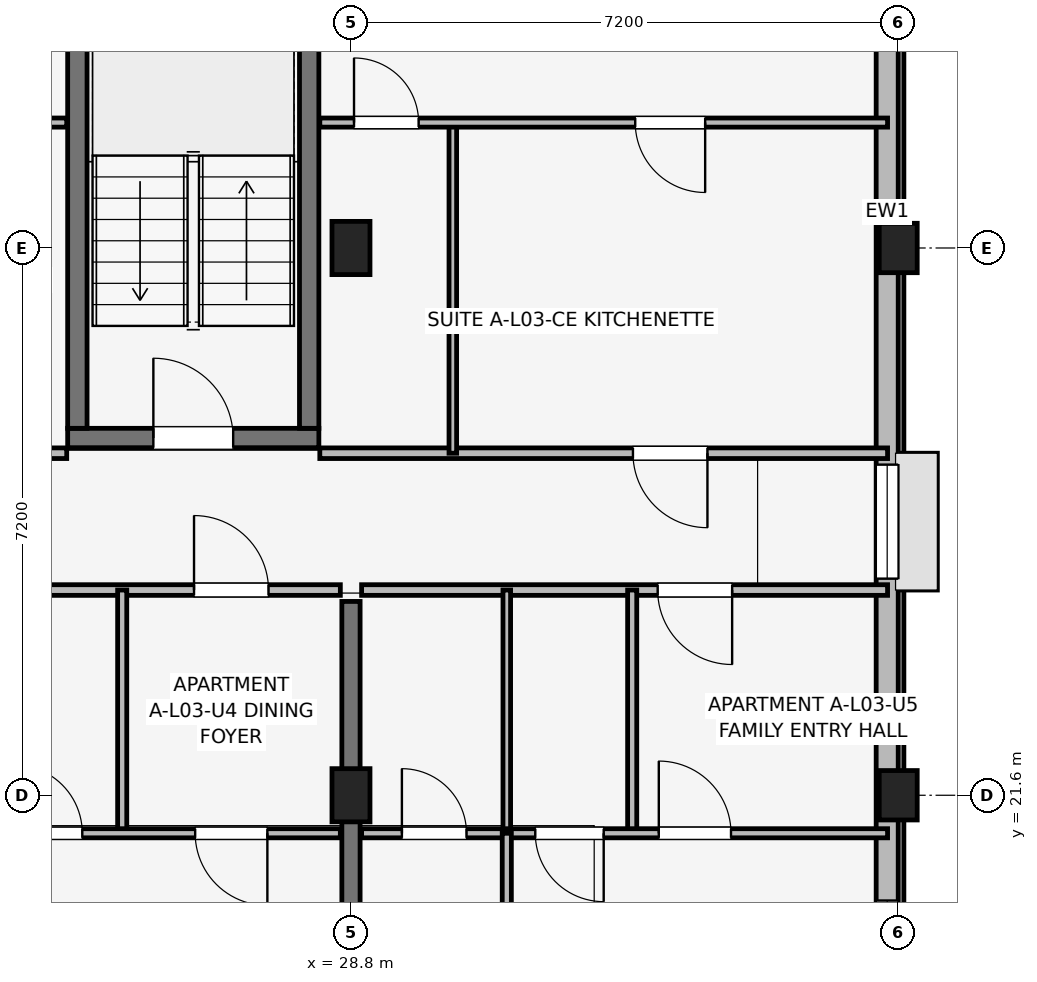
"""IFC4 building model, lengths in metres.
Left out: names, types, materials, properties, quantities, classifications, styles, units other than length and angle.
Written with IfcOpenShell. Run it as: python <this file> out.ifc"""

import sys

from ifc_helpers import new_model, si_unit, direction, frame, frame_2d, origin, origin_2d, place, context, subcontext, project, spatial, rectangle, extrude, element, fill, save


model = new_model("IFC4")
c1 = context("Model", 3, precision=1e-05, world=origin(), true_north=direction((0.0, 1.0)))
c2 = subcontext(c1, "Body", "Model", "MODEL_VIEW")
j1 = project(units=[si_unit("LENGTHUNIT", "METRE"), si_unit("PLANEANGLEUNIT", "RADIAN")], contexts=[c1])
p1 = place(None, origin())
s1 = spatial("IfcSite", under=j1, at=p1, CompositionType="ELEMENT")
p2 = place(p1, origin())
s2 = spatial("IfcBuilding", under=s1, at=p2, CompositionType="ELEMENT")
p3 = place(p2, frame((0.0, 0.0, 11.85)))
s3 = spatial("IfcBuildingStorey", under=s2, at=p3, CompositionType="ELEMENT", Elevation=11.85)
for number, where, z_axis, x_axis in (
    (1, (28.8, 21.6, 0.0), (0.0, 0.0, 1.0), (1.0, 0.0, 0.0)),
    (2, (28.8, 28.8, 0.0), (0.0, 0.0, 1.0), (1.0, 0.0, 0.0)),
):
    element("IfcColumn", number, at=place(p3, frame(where, z_axis=z_axis, x_axis=x_axis)), inside=s3, PredefinedType="COLUMN", context=c2, shape_type="SweptSolid", body=[
        extrude(rectangle(XDim=0.5, YDim=0.7, at=origin_2d()), origin(), (0.0, 0.0, 1.0), 3.15),
    ])
for number, where, z_axis, x_axis in (
    (3, (36.0, 21.6, 0.0), (0.0, 0.0, 1.0), (1.0, 0.0, 0.0)),
    (4, (36.0, 28.8, 0.0), (0.0, 0.0, 1.0), (1.0, 0.0, 0.0)),
):
    element("IfcColumn", number, at=place(p3, frame(where, z_axis=z_axis, x_axis=x_axis)), inside=s3, PredefinedType="COLUMN", context=c2, shape_type="SweptSolid", body=[
        extrude(rectangle(XDim=0.5, YDim=0.65, at=origin_2d()), origin(), (0.0, 0.0, 1.0), 3.15),
    ])
p4 = place(p3, frame((25.073, 26.3, 0.0), z_axis=(0.0, 0.0, 1.0), x_axis=(1.0, 0.0, 0.0)))
e5 = element("IfcWall", 5, at=p4, inside=s3, PredefinedType="SHEAR", context=c2, shape_type="SweptSolid", body=[
    extrude(rectangle(XDim=3.305, YDim=0.255, at=frame_2d((1.652, 0.0))), origin(), (0.0, 0.0, 1.0), 3.15),
])
p5 = place(p4, frame((1.127, 0.0, 0.0)))
e6 = element("IfcOpeningElement", 6, at=p5, cuts=e5, PredefinedType="OPENING", context=c2, shape_type="SweptSolid", body=[
    extrude(rectangle(XDim=1.05, YDim=2.12, at=frame_2d((0.525, 1.06))), frame((0.0, 0.137, 0.0), z_axis=(0.0, -1.0, 0.0), x_axis=(1.0, 0.0, 0.0)), (0.0, 0.0, 1.0), 0.275),
])
for number, where, z_axis, x_axis in (
    (7, (25.2, 26.427, 0.0), (0.0, 0.0, 1.0), (0.0, 1.0, 0.0)),
    (8, (28.25, 26.427, 0.0), (0.0, 0.0, 1.0), (0.0, 1.0, 0.0)),
):
    element("IfcWall", number, at=place(p3, frame(where, z_axis=z_axis, x_axis=x_axis)), inside=s3, PredefinedType="SHEAR", context=c2, shape_type="SweptSolid", body=[
        extrude(rectangle(XDim=6.295, YDim=0.255, at=frame_2d((3.147, 0.0))), origin(), (0.0, 0.0, 1.0), 3.15),
    ])
p6 = place(p3, frame((28.8, 14.75, 0.0), z_axis=(0.0, 0.0, 1.0), x_axis=(0.0, 1.0, 0.0)))
e9 = element("IfcWall", 9, at=p6, inside=s3, PredefinedType="SHEAR", context=c2, shape_type="SweptSolid", body=[
    extrude(rectangle(XDim=9.4, YDim=0.24, at=frame_2d((4.7, 0.0))), origin(), (0.0, 0.0, 1.0), 3.15),
])
p7 = place(p3, frame((35.855, 17.8, 0.0), z_axis=(0.0, 0.0, 1.0), x_axis=(0.0, 1.0, 0.0)))
e10 = element("IfcWall", 10, at=p7, inside=s3, PredefinedType="SOLIDWALL", context=c2, shape_type="SweptSolid", body=[
    extrude(rectangle(XDim=14.8, YDim=0.29, at=frame_2d((7.4, 0.0))), origin(), (0.0, 0.0, 1.0), 2.38),
])
p8 = place(p7, frame((6.65, 0.0, 1.05)))
e11 = element("IfcOpeningElement", 11, at=p8, cuts=e10, PredefinedType="OPENING", context=c2, shape_type="SweptSolid", body=[
    extrude(rectangle(XDim=1.5, YDim=1.15, at=frame_2d((0.75, 0.575))), frame((0.0, 0.155, 0.0), z_axis=(0.0, -1.0, 0.0), x_axis=(1.0, 0.0, 0.0)), (0.0, 0.0, 1.0), 0.31),
])
p9 = place(p7, frame((1.115, 0.0, 0.72)))
e12 = element("IfcOpeningElement", 12, at=p9, cuts=e10, PredefinedType="OPENING", context=c2, shape_type="SweptSolid", body=[
    extrude(rectangle(XDim=1.3, YDim=1.55, at=frame_2d((0.65, 0.775))), frame((0.0, 0.155, 0.0), z_axis=(0.0, -1.0, 0.0), x_axis=(1.0, 0.0, 0.0)), (0.0, 0.0, 1.0), 0.31),
])
p10 = place(p3, frame((21.74, 24.3, 0.0), z_axis=(0.0, 0.0, 1.0), x_axis=(1.0, 0.0, 0.0)))
e13 = element("IfcWall", 13, at=p10, inside=s3, PredefinedType="PARTITIONING", context=c2, shape_type="SweptSolid", body=[
    extrude(rectangle(XDim=6.92, YDim=0.14, at=frame_2d((3.46, 0.0))), origin(), (0.0, 0.0, 1.0), 2.38),
])
p11 = place(p10, frame((4.995, 0.0, 0.0)))
e14 = element("IfcOpeningElement", 14, at=p11, cuts=e13, PredefinedType="OPENING", context=c2, shape_type="SweptSolid", body=[
    extrude(rectangle(XDim=0.98, YDim=2.1, at=frame_2d((0.49, 1.05))), frame((0.0, 0.08, 0.0), z_axis=(0.0, -1.0, 0.0), x_axis=(1.0, 0.0, 0.0)), (0.0, 0.0, 1.0), 0.16),
])
p12 = place(p3, frame((25.79, 21.1, 0.0), z_axis=(0.0, 0.0, 1.0), x_axis=(0.0, 1.0, 0.0)))
e15 = element("IfcWall", 15, at=p12, inside=s3, PredefinedType="PARTITIONING", context=c2, shape_type="SweptSolid", body=[
    extrude(rectangle(XDim=3.2, YDim=0.12, at=frame_2d((1.6, 0.0))), origin(), (0.0, 0.0, 1.0), 2.375),
])
p13 = place(p3, frame((21.74, 21.1, 0.0), z_axis=(0.0, 0.0, 1.0), x_axis=(1.0, 0.0, 0.0)))
e16 = element("IfcWall", 16, at=p13, inside=s3, PredefinedType="PARTITIONING", context=c2, shape_type="SweptSolid", body=[
    extrude(rectangle(XDim=6.92, YDim=0.12, at=frame_2d((3.46, 0.0))), origin(), (0.0, 0.0, 1.0), 2.38),
])
p14 = place(p13, frame((1.475, 0.0, 0.0), z_axis=(0.0, 0.0, 1.0), x_axis=(-1.0, 0.0, 0.0)))
e17 = element("IfcOpeningElement", 17, at=p14, cuts=e16, PredefinedType="OPENING", context=c2, shape_type="SweptSolid", body=[
    extrude(rectangle(XDim=0.85, YDim=2.08, at=frame_2d((0.425, 1.04))), frame((0.0, 0.07, 0.0), z_axis=(0.0, -1.0, 0.0), x_axis=(1.0, 0.0, 0.0)), (0.0, 0.0, 1.0), 0.14),
])
p15 = place(p13, frame((2.625, 0.0, 0.0)))
e18 = element("IfcOpeningElement", 18, at=p15, cuts=e16, PredefinedType="OPENING", context=c2, shape_type="SweptSolid", body=[
    extrude(rectangle(XDim=0.9, YDim=2.08, at=frame_2d((0.45, 1.04))), frame((0.0, 0.07, 0.0), z_axis=(0.0, -1.0, 0.0), x_axis=(1.0, 0.0, 0.0)), (0.0, 0.0, 1.0), 0.14),
])
p16 = place(p13, frame((5.96, 0.0, 0.0), z_axis=(0.0, 0.0, 1.0), x_axis=(-1.0, 0.0, 0.0)))
e19 = element("IfcOpeningElement", 19, at=p16, cuts=e16, PredefinedType="OPENING", context=c2, shape_type="SweptSolid", body=[
    extrude(rectangle(XDim=0.95, YDim=2.08, at=frame_2d((0.475, 1.04))), frame((0.0, 0.07, 0.0), z_axis=(0.0, -1.0, 0.0), x_axis=(1.0, 0.0, 0.0)), (0.0, 0.0, 1.0), 0.14),
])
p17 = place(p3, frame((28.94, 24.3, 0.0), z_axis=(0.0, 0.0, 1.0), x_axis=(1.0, 0.0, 0.0)))
e20 = element("IfcWall", 20, at=p17, inside=s3, PredefinedType="PARTITIONING", context=c2, shape_type="SweptSolid", body=[
    extrude(rectangle(XDim=6.92, YDim=0.14, at=frame_2d((3.46, 0.0))), origin(), (0.0, 0.0, 1.0), 2.38),
])
p18 = place(p17, frame((4.875, 0.0, 0.0), z_axis=(0.0, 0.0, 1.0), x_axis=(-1.0, 0.0, 0.0)))
e21 = element("IfcOpeningElement", 21, at=p18, cuts=e20, PredefinedType="OPENING", context=c2, shape_type="SweptSolid", body=[
    extrude(rectangle(XDim=0.98, YDim=2.1, at=frame_2d((0.49, 1.05))), frame((0.0, 0.08, 0.0), z_axis=(0.0, -1.0, 0.0), x_axis=(1.0, 0.0, 0.0)), (0.0, 0.0, 1.0), 0.16),
])
p19 = place(p3, frame((30.85, 21.1, 0.0), z_axis=(0.0, 0.0, 1.0), x_axis=(0.0, 1.0, 0.0)))
e22 = element("IfcWall", 22, at=p19, inside=s3, PredefinedType="PARTITIONING", context=c2, shape_type="SweptSolid", body=[
    extrude(rectangle(XDim=3.2, YDim=0.1, at=frame_2d((1.6, 0.0))), origin(), (0.0, 0.0, 1.0), 2.375),
])
p20 = place(p3, frame((32.5, 21.1, 0.0), z_axis=(0.0, 0.0, 1.0), x_axis=(0.0, 1.0, 0.0)))
e23 = element("IfcWall", 23, at=p20, inside=s3, PredefinedType="PARTITIONING", context=c2, shape_type="SweptSolid", body=[
    extrude(rectangle(XDim=3.2, YDim=0.12, at=frame_2d((1.6, 0.0))), origin(), (0.0, 0.0, 1.0), 2.375),
])
p21 = place(p3, frame((28.94, 21.1, 0.0), z_axis=(0.0, 0.0, 1.0), x_axis=(1.0, 0.0, 0.0)))
e24 = element("IfcWall", 24, at=p21, inside=s3, PredefinedType="PARTITIONING", context=c2, shape_type="SweptSolid", body=[
    extrude(rectangle(XDim=6.92, YDim=0.12, at=frame_2d((3.46, 0.0))), origin(), (0.0, 0.0, 1.0), 2.38),
])
p22 = place(p21, frame((0.53, 0.0, 0.0)))
e25 = element("IfcOpeningElement", 25, at=p22, cuts=e24, PredefinedType="OPENING", context=c2, shape_type="SweptSolid", body=[
    extrude(rectangle(XDim=0.85, YDim=2.08, at=frame_2d((0.425, 1.04))), frame((0.0, 0.07, 0.0), z_axis=(0.0, -1.0, 0.0), x_axis=(1.0, 0.0, 0.0)), (0.0, 0.0, 1.0), 0.14),
])
p23 = place(p21, frame((3.185, 0.0, 0.0), z_axis=(0.0, 0.0, 1.0), x_axis=(-1.0, 0.0, 0.0)))
e26 = element("IfcOpeningElement", 26, at=p23, cuts=e24, PredefinedType="OPENING", context=c2, shape_type="SweptSolid", body=[
    extrude(rectangle(XDim=0.9, YDim=2.08, at=frame_2d((0.45, 1.04))), frame((0.0, 0.07, 0.0), z_axis=(0.0, -1.0, 0.0), x_axis=(1.0, 0.0, 0.0)), (0.0, 0.0, 1.0), 0.14),
])
p24 = place(p21, frame((3.91, 0.0, 0.0)))
e27 = element("IfcOpeningElement", 27, at=p24, cuts=e24, PredefinedType="OPENING", context=c2, shape_type="SweptSolid", body=[
    extrude(rectangle(XDim=0.95, YDim=2.08, at=frame_2d((0.475, 1.04))), frame((0.0, 0.07, 0.0), z_axis=(0.0, -1.0, 0.0), x_axis=(1.0, 0.0, 0.0)), (0.0, 0.0, 1.0), 0.14),
])
p25 = place(p3, frame((30.85, 14.7, 0.0), z_axis=(0.0, 0.0, 1.0), x_axis=(0.0, 1.0, 0.0)))
e28 = element("IfcWall", 28, at=p25, inside=s3, PredefinedType="PARTITIONING", context=c2, shape_type="SweptSolid", body=[
    extrude(rectangle(XDim=6.4, YDim=0.12, at=frame_2d((3.2, 0.0))), origin(), (0.0, 0.0, 1.0), 2.38),
])
p26 = place(p25, frame((3.65, 0.0, 0.0), z_axis=(0.0, 0.0, 1.0), x_axis=(-1.0, 0.0, 0.0)))
e29 = element("IfcOpeningElement", 29, at=p26, cuts=e28, PredefinedType="OPENING", context=c2, shape_type="SweptSolid", body=[
    extrude(rectangle(XDim=0.9, YDim=2.08, at=frame_2d((0.45, 1.04))), frame((0.0, 0.07, 0.0), z_axis=(0.0, -1.0, 0.0), x_axis=(1.0, 0.0, 0.0)), (0.0, 0.0, 1.0), 0.14),
])
p27 = place(p3, frame((21.34, 26.1, 0.0), z_axis=(0.0, 0.0, 1.0), x_axis=(1.0, 0.0, 0.0)))
e30 = element("IfcWall", 30, at=p27, inside=s3, PredefinedType="PARTITIONING", context=c2, shape_type="SweptSolid", body=[
    extrude(rectangle(XDim=3.72, YDim=0.14, at=frame_2d((1.86, 0.0))), origin(), (0.0, 0.0, 1.0), 2.38),
])
p28 = place(p27, frame((2.151, 0.0, 0.0)))
e31 = element("IfcOpeningElement", 31, at=p28, cuts=e30, PredefinedType="OPENING", context=c2, shape_type="SweptSolid", body=[
    extrude(rectangle(XDim=0.98, YDim=2.1, at=frame_2d((0.49, 1.05))), frame((0.0, 0.08, 0.0), z_axis=(0.0, -1.0, 0.0), x_axis=(1.0, 0.0, 0.0)), (0.0, 0.0, 1.0), 0.16),
])
p29 = place(p3, frame((21.34, 30.45, 0.0), z_axis=(0.0, 0.0, 1.0), x_axis=(1.0, 0.0, 0.0)))
e32 = element("IfcWall", 32, at=p29, inside=s3, PredefinedType="PARTITIONING", context=c2, shape_type="SweptSolid", body=[
    extrude(rectangle(XDim=3.72, YDim=0.12, at=frame_2d((1.86, 0.0))), origin(), (0.0, 0.0, 1.0), 2.38),
])
p30 = place(p29, frame((1.206, 0.0, 0.0), z_axis=(0.0, 0.0, 1.0), x_axis=(-1.0, 0.0, 0.0)))
e33 = element("IfcOpeningElement", 33, at=p30, cuts=e32, PredefinedType="OPENING", context=c2, shape_type="SweptSolid", body=[
    extrude(rectangle(XDim=0.85, YDim=2.08, at=frame_2d((0.425, 1.04))), frame((0.0, 0.07, 0.0), z_axis=(0.0, -1.0, 0.0), x_axis=(1.0, 0.0, 0.0)), (0.0, 0.0, 1.0), 0.14),
])
p31 = place(p29, frame((2.181, 0.0, 0.0)))
e34 = element("IfcOpeningElement", 34, at=p31, cuts=e32, PredefinedType="OPENING", context=c2, shape_type="SweptSolid", body=[
    extrude(rectangle(XDim=0.92, YDim=2.08, at=frame_2d((0.46, 1.04))), frame((0.0, 0.07, 0.0), z_axis=(0.0, -1.0, 0.0), x_axis=(1.0, 0.0, 0.0)), (0.0, 0.0, 1.0), 0.14),
])
p32 = place(p3, frame((28.39, 26.1, 0.0), z_axis=(0.0, 0.0, 1.0), x_axis=(1.0, 0.0, 0.0)))
e35 = element("IfcWall", 35, at=p32, inside=s3, PredefinedType="PARTITIONING", context=c2, shape_type="SweptSolid", body=[
    extrude(rectangle(XDim=7.47, YDim=0.14, at=frame_2d((3.735, 0.0))), origin(), (0.0, 0.0, 1.0), 2.38),
])
p33 = place(p32, frame((5.1, 0.0, 0.0), z_axis=(0.0, 0.0, 1.0), x_axis=(-1.0, 0.0, 0.0)))
e36 = element("IfcOpeningElement", 36, at=p33, cuts=e35, PredefinedType="OPENING", context=c2, shape_type="SweptSolid", body=[
    extrude(rectangle(XDim=0.98, YDim=2.1, at=frame_2d((0.49, 1.05))), frame((0.0, 0.08, 0.0), z_axis=(0.0, -1.0, 0.0), x_axis=(1.0, 0.0, 0.0)), (0.0, 0.0, 1.0), 0.16),
])
p34 = place(p3, frame((30.14, 26.1, 0.0), z_axis=(0.0, 0.0, 1.0), x_axis=(0.0, 1.0, 0.0)))
e37 = element("IfcWall", 37, at=p34, inside=s3, PredefinedType="PARTITIONING", context=c2, shape_type="SweptSolid", body=[
    extrude(rectangle(XDim=4.35, YDim=0.1, at=frame_2d((2.175, 0.0))), origin(), (0.0, 0.0, 1.0), 2.375),
])
p35 = place(p3, frame((28.39, 30.45, 0.0), z_axis=(0.0, 0.0, 1.0), x_axis=(1.0, 0.0, 0.0)))
e38 = element("IfcWall", 38, at=p35, inside=s3, PredefinedType="PARTITIONING", context=c2, shape_type="SweptSolid", body=[
    extrude(rectangle(XDim=7.47, YDim=0.12, at=frame_2d((3.735, 0.0))), origin(), (0.0, 0.0, 1.0), 2.38),
])
p36 = place(p35, frame((0.45, 0.0, 0.0)))
e39 = element("IfcOpeningElement", 39, at=p36, cuts=e38, PredefinedType="OPENING", context=c2, shape_type="SweptSolid", body=[
    extrude(rectangle(XDim=0.85, YDim=2.08, at=frame_2d((0.425, 1.04))), frame((0.0, 0.07, 0.0), z_axis=(0.0, -1.0, 0.0), x_axis=(1.0, 0.0, 0.0)), (0.0, 0.0, 1.0), 0.14),
])
p37 = place(p35, frame((5.07, 0.0, 0.0), z_axis=(0.0, 0.0, 1.0), x_axis=(-1.0, 0.0, 0.0)))
e40 = element("IfcOpeningElement", 40, at=p37, cuts=e38, PredefinedType="OPENING", context=c2, shape_type="SweptSolid", body=[
    extrude(rectangle(XDim=0.92, YDim=2.08, at=frame_2d((0.46, 1.04))), frame((0.0, 0.07, 0.0), z_axis=(0.0, -1.0, 0.0), x_axis=(1.0, 0.0, 0.0)), (0.0, 0.0, 1.0), 0.14),
])
p38 = place(p8, origin())
e41 = element("IfcWindow", 41, at=p38, inside=s3, PartitioningType="SINGLE_PANEL", PredefinedType="WINDOW", context=c2, shape_type="SweptSolid", body=[
    extrude(rectangle(XDim=1.5, YDim=1.15, at=frame_2d((0.75, 0.575))), frame((0.0, 0.03, 0.0), z_axis=(0.0, -1.0, 0.0), x_axis=(1.0, 0.0, 0.0)), (0.0, 0.0, 1.0), 0.06),
])
fill(e11, e41)
p39 = place(p9, origin())
e42 = element("IfcWindow", 42, at=p39, inside=s3, PartitioningType="SINGLE_PANEL", PredefinedType="WINDOW", context=c2, shape_type="SweptSolid", body=[
    extrude(rectangle(XDim=1.3, YDim=1.55, at=frame_2d((0.65, 0.775))), frame((0.0, 0.03, 0.0), z_axis=(0.0, -1.0, 0.0), x_axis=(1.0, 0.0, 0.0)), (0.0, 0.0, 1.0), 0.06),
])
fill(e12, e42)
p40 = place(p11, origin())
e43 = element("IfcDoor", 43, at=p40, inside=s3, OperationType="SINGLE_SWING_LEFT", PredefinedType="DOOR", context=c2, shape_type="SweptSolid", body=[
    extrude(rectangle(XDim=0.98, YDim=2.1, at=frame_2d((0.49, 1.05))), frame((0.0, 0.025, 0.0), z_axis=(0.0, -1.0, 0.0), x_axis=(1.0, 0.0, 0.0)), (0.0, 0.0, 1.0), 0.05),
])
fill(e14, e43)
p41 = place(p15, origin())
e44 = element("IfcDoor", 44, at=p41, inside=s3, OperationType="SINGLE_SWING_LEFT", PredefinedType="DOOR", context=c2, shape_type="SweptSolid", body=[
    extrude(rectangle(XDim=0.9, YDim=2.08, at=frame_2d((0.45, 1.04))), frame((0.0, 0.025, 0.0), z_axis=(0.0, -1.0, 0.0), x_axis=(1.0, 0.0, 0.0)), (0.0, 0.0, 1.0), 0.05),
])
fill(e18, e44)
p42 = place(p16, origin())
e45 = element("IfcDoor", 45, at=p42, inside=s3, OperationType="SINGLE_SWING_RIGHT", PredefinedType="DOOR", context=c2, shape_type="SweptSolid", body=[
    extrude(rectangle(XDim=0.95, YDim=2.08, at=frame_2d((0.475, 1.04))), frame((0.0, 0.025, 0.0), z_axis=(0.0, -1.0, 0.0), x_axis=(1.0, 0.0, 0.0)), (0.0, 0.0, 1.0), 0.05),
])
fill(e19, e45)
p43 = place(p18, origin())
e46 = element("IfcDoor", 46, at=p43, inside=s3, OperationType="SINGLE_SWING_RIGHT", PredefinedType="DOOR", context=c2, shape_type="SweptSolid", body=[
    extrude(rectangle(XDim=0.98, YDim=2.1, at=frame_2d((0.49, 1.05))), frame((0.0, 0.025, 0.0), z_axis=(0.0, -1.0, 0.0), x_axis=(1.0, 0.0, 0.0)), (0.0, 0.0, 1.0), 0.05),
])
fill(e21, e46)
p44 = place(p22, origin())
e47 = element("IfcDoor", 47, at=p44, inside=s3, OperationType="SINGLE_SWING_LEFT", PredefinedType="DOOR", context=c2, shape_type="SweptSolid", body=[
    extrude(rectangle(XDim=0.85, YDim=2.08, at=frame_2d((0.425, 1.04))), frame((0.0, 0.025, 0.0), z_axis=(0.0, -1.0, 0.0), x_axis=(1.0, 0.0, 0.0)), (0.0, 0.0, 1.0), 0.05),
])
fill(e25, e47)
p45 = place(p23, origin())
e48 = element("IfcDoor", 48, at=p45, inside=s3, OperationType="SINGLE_SWING_RIGHT", PredefinedType="DOOR", context=c2, shape_type="SweptSolid", body=[
    extrude(rectangle(XDim=0.9, YDim=2.08, at=frame_2d((0.45, 1.04))), frame((0.0, 0.025, 0.0), z_axis=(0.0, -1.0, 0.0), x_axis=(1.0, 0.0, 0.0)), (0.0, 0.0, 1.0), 0.05),
])
fill(e26, e48)
p46 = place(p24, origin())
e49 = element("IfcDoor", 49, at=p46, inside=s3, OperationType="SINGLE_SWING_LEFT", PredefinedType="DOOR", context=c2, shape_type="SweptSolid", body=[
    extrude(rectangle(XDim=0.95, YDim=2.08, at=frame_2d((0.475, 1.04))), frame((0.0, 0.025, 0.0), z_axis=(0.0, -1.0, 0.0), x_axis=(1.0, 0.0, 0.0)), (0.0, 0.0, 1.0), 0.05),
])
fill(e27, e49)
p47 = place(p33, origin())
e50 = element("IfcDoor", 50, at=p47, inside=s3, OperationType="SINGLE_SWING_RIGHT", PredefinedType="DOOR", context=c2, shape_type="SweptSolid", body=[
    extrude(rectangle(XDim=0.98, YDim=2.1, at=frame_2d((0.49, 1.05))), frame((0.0, 0.025, 0.0), z_axis=(0.0, -1.0, 0.0), x_axis=(1.0, 0.0, 0.0)), (0.0, 0.0, 1.0), 0.05),
])
fill(e36, e50)
p48 = place(p36, origin())
e51 = element("IfcDoor", 51, at=p48, inside=s3, OperationType="SINGLE_SWING_LEFT", PredefinedType="DOOR", context=c2, shape_type="SweptSolid", body=[
    extrude(rectangle(XDim=0.85, YDim=2.08, at=frame_2d((0.425, 1.04))), frame((0.0, 0.025, 0.0), z_axis=(0.0, -1.0, 0.0), x_axis=(1.0, 0.0, 0.0)), (0.0, 0.0, 1.0), 0.05),
])
fill(e39, e51)
p49 = place(p37, origin())
e52 = element("IfcDoor", 52, at=p49, inside=s3, OperationType="SINGLE_SWING_RIGHT", PredefinedType="DOOR", context=c2, shape_type="SweptSolid", body=[
    extrude(rectangle(XDim=0.92, YDim=2.08, at=frame_2d((0.46, 1.04))), frame((0.0, 0.025, 0.0), z_axis=(0.0, -1.0, 0.0), x_axis=(1.0, 0.0, 0.0)), (0.0, 0.0, 1.0), 0.05),
])
fill(e40, e52)
p50 = place(p5, origin())
e53 = element("IfcDoor", 53, at=p50, inside=s3, OperationType="SINGLE_SWING_LEFT", PredefinedType="DOOR", context=c2, shape_type="SweptSolid", body=[
    extrude(rectangle(XDim=1.05, YDim=2.12, at=frame_2d((0.525, 1.06))), frame((0.0, 0.025, 0.0), z_axis=(0.0, -1.0, 0.0), x_axis=(1.0, 0.0, 0.0)), (0.0, 0.0, 1.0), 0.05),
])
fill(e6, e53)
save(model, sys.argv[1])
